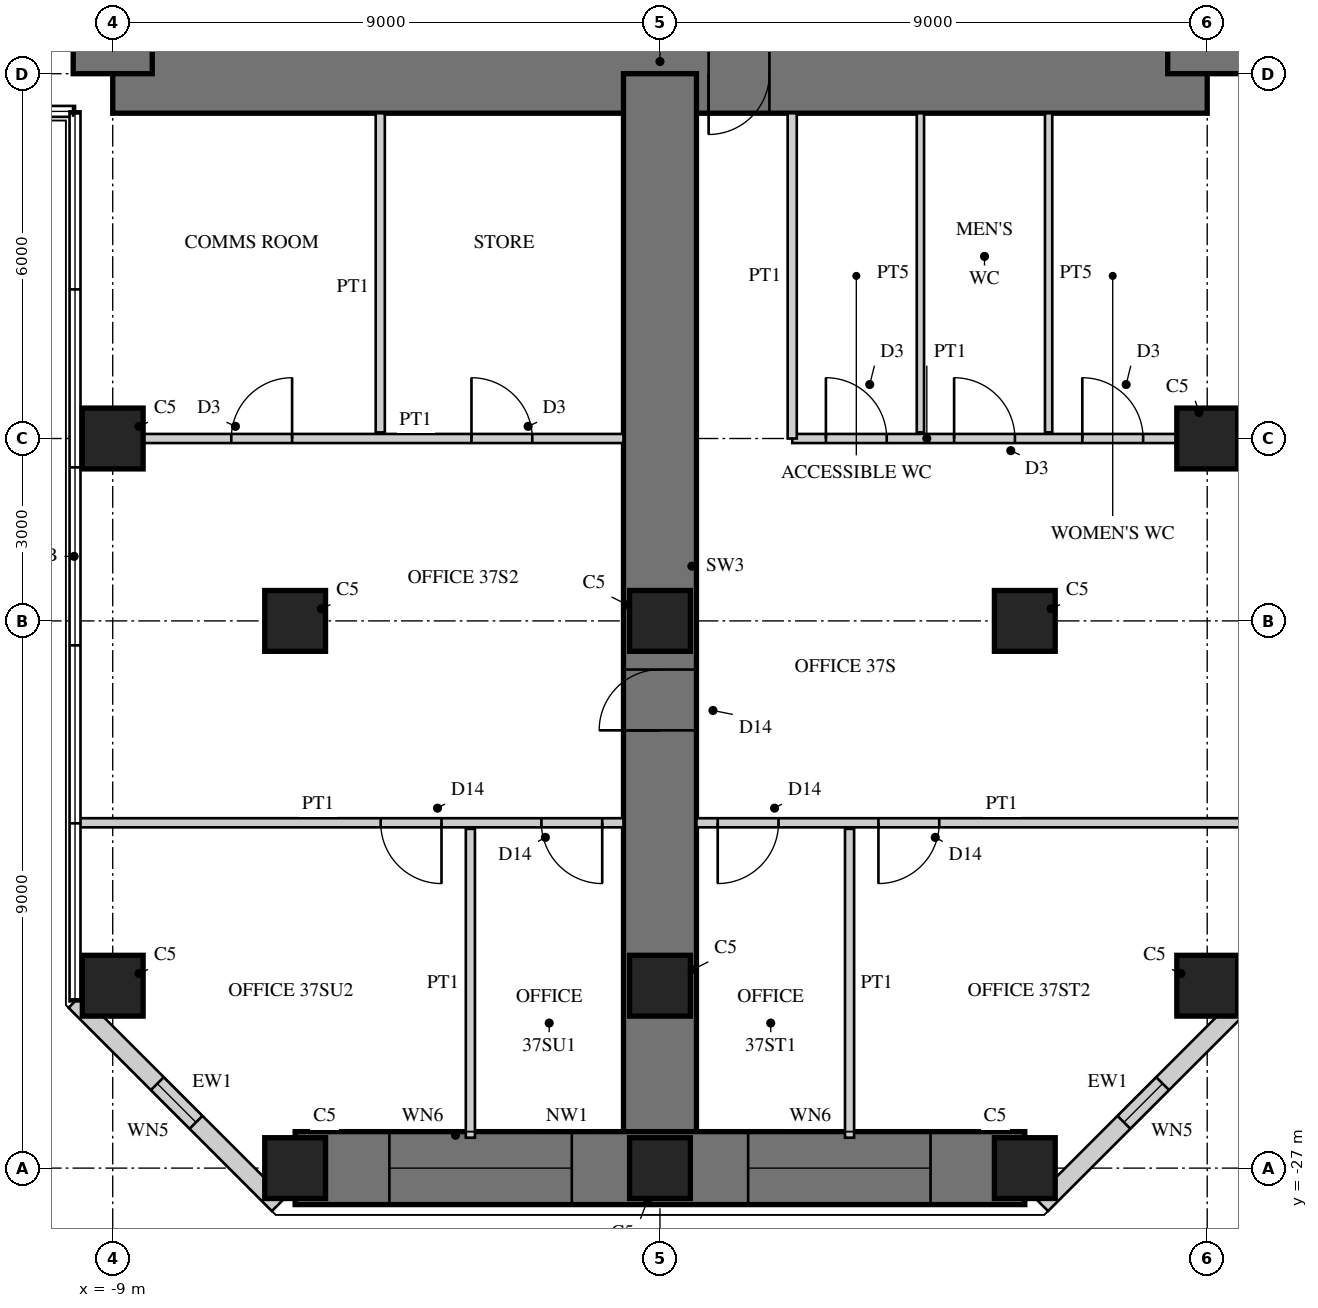
"""IFC4 building model, lengths in metres.
Left out: names, types, materials, properties, quantities, classifications, styles, units other than length and angle.
Written with IfcOpenShell. Run it as: python <this file> out.ifc"""

import sys

from ifc_helpers import new_model, si_unit, direction, frame, frame_2d, origin, origin_2d, place, context, subcontext, project, spatial, rectangle, hollow_rectangle, extrude, element, fill, save


model = new_model("IFC4")
c1 = context("Model", 3, precision=1e-05, world=origin(), true_north=direction((0.0, 1.0)))
c2 = subcontext(c1, "Body", "Model", "MODEL_VIEW")
j1 = project(units=[si_unit("LENGTHUNIT", "METRE"), si_unit("PLANEANGLEUNIT", "RADIAN")], contexts=[c1])
p1 = place(None, origin())
s1 = spatial("IfcSite", under=j1, at=p1, CompositionType="ELEMENT")
p2 = place(p1, origin())
s2 = spatial("IfcBuilding", under=s1, at=p2, CompositionType="ELEMENT")
p3 = place(p2, frame((0.0, 0.0, 152.5)))
s3 = spatial("IfcBuildingStorey", under=s2, at=p3, CompositionType="ELEMENT", Elevation=152.5)
p4 = place(p3, frame((-9.0, -9.0, 0.0), z_axis=(0.0, 0.0, 1.0), x_axis=(1.0, 0.0, 0.0)))
e1 = element("IfcWall", 1, at=p4, inside=s3, PredefinedType="SHEAR", context=c2, shape_type="SweptSolid", body=[
    extrude(rectangle(XDim=18.0, YDim=1.3, at=frame_2d((9.0, 0.0))), origin(), (0.0, 0.0, 1.0), 4.0),
])
p5 = place(p4, frame((9.8, 0.0, 0.0)))
e2 = element("IfcOpeningElement", 2, at=p5, cuts=e1, PredefinedType="OPENING", context=c2, shape_type="SweptSolid", body=[
    extrude(rectangle(XDim=1.0, YDim=2.4, at=frame_2d((0.5, 1.2))), frame((0.0, 0.66, 0.0), z_axis=(0.0, -1.0, 0.0), x_axis=(1.0, 0.0, 0.0)), (0.0, 0.0, 1.0), 1.32),
])
p6 = place(p3, frame((9.0, -9.0, 0.0), z_axis=(0.0, 0.0, 1.0), x_axis=(0.0, 1.0, 0.0)))
e3 = element("IfcWall", 3, at=p6, inside=s3, PredefinedType="SHEAR", context=c2, shape_type="SweptSolid", body=[
    extrude(rectangle(XDim=18.0, YDim=1.3, at=frame_2d((9.0, 0.0))), origin(), (0.0, 0.0, 1.0), 4.0),
])
p7 = place(p6, frame((9.8, 0.0, 0.0)))
e4 = element("IfcOpeningElement", 4, at=p7, cuts=e3, PredefinedType="OPENING", context=c2, shape_type="SweptSolid", body=[
    extrude(rectangle(XDim=1.0, YDim=2.4, at=frame_2d((0.5, 1.2))), frame((0.0, 0.66, 0.0), z_axis=(0.0, -1.0, 0.0), x_axis=(1.0, 0.0, 0.0)), (0.0, 0.0, 1.0), 1.32),
])
p8 = place(p3, frame((-9.0, 9.0, 0.0), z_axis=(0.0, 0.0, 1.0), x_axis=(0.0, -1.0, 0.0)))
e5 = element("IfcWall", 5, at=p8, inside=s3, PredefinedType="SHEAR", context=c2, shape_type="SweptSolid", body=[
    extrude(rectangle(XDim=18.0, YDim=1.3, at=frame_2d((9.0, 0.0))), origin(), (0.0, 0.0, 1.0), 4.0),
])
p9 = place(p8, frame((9.8, 0.0, 0.0)))
e6 = element("IfcOpeningElement", 6, at=p9, cuts=e5, PredefinedType="OPENING", context=c2, shape_type="SweptSolid", body=[
    extrude(rectangle(XDim=1.0, YDim=2.4, at=frame_2d((0.5, 1.2))), frame((0.0, 0.66, 0.0), z_axis=(0.0, -1.0, 0.0), x_axis=(1.0, 0.0, 0.0)), (0.0, 0.0, 1.0), 1.32),
])
p10 = place(p3, frame((0.0, -9.0, 0.0), z_axis=(0.0, 0.0, 1.0), x_axis=(0.0, -1.0, 0.0)))
e7 = element("IfcWall", 7, at=p10, inside=s3, PredefinedType="SHEAR", context=c2, shape_type="SweptSolid", body=[
    extrude(rectangle(XDim=18.0, YDim=1.2, at=frame_2d((9.0, 0.0))), origin(), (0.0, 0.0, 1.0), 4.0),
])
p11 = place(p10, frame((9.8, 0.0, 0.0)))
e8 = element("IfcOpeningElement", 8, at=p11, cuts=e7, PredefinedType="OPENING", context=c2, shape_type="SweptSolid", body=[
    extrude(rectangle(XDim=1.0, YDim=2.2, at=frame_2d((0.5, 1.1))), frame((0.0, 0.61, 0.0), z_axis=(0.0, -1.0, 0.0), x_axis=(1.0, 0.0, 0.0)), (0.0, 0.0, 1.0), 1.22),
])
p12 = place(p3, frame((-6.0, -27.0, 0.0), z_axis=(0.0, 0.0, 1.0), x_axis=(1.0, 0.0, 0.0)))
e9 = element("IfcWall", 9, at=p12, inside=s3, PredefinedType="SHEAR", context=c2, shape_type="SweptSolid", body=[
    extrude(rectangle(XDim=12.0, YDim=1.2, at=frame_2d((6.0, 0.0))), origin(), (0.0, 0.0, 1.0), 4.0),
])
p13 = place(p12, frame((1.55, 0.0, 0.6)))
e10 = element("IfcOpeningElement", 10, at=p13, cuts=e9, PredefinedType="OPENING", context=c2, shape_type="SweptSolid", body=[
    extrude(rectangle(XDim=3.0, YDim=2.4, at=frame_2d((1.5, 1.2))), frame((0.0, 0.61, 0.0), z_axis=(0.0, -1.0, 0.0), x_axis=(1.0, 0.0, 0.0)), (0.0, 0.0, 1.0), 1.22),
])
p14 = place(p12, frame((7.45, 0.0, 0.6)))
e11 = element("IfcOpeningElement", 11, at=p14, cuts=e9, PredefinedType="OPENING", context=c2, shape_type="SweptSolid", body=[
    extrude(rectangle(XDim=3.0, YDim=2.4, at=frame_2d((1.5, 1.2))), frame((0.0, 0.61, 0.0), z_axis=(0.0, -1.0, 0.0), x_axis=(1.0, 0.0, 0.0)), (0.0, 0.0, 1.0), 1.22),
])
for number, where, z_axis, x_axis in (
    (12, (-9.0, -15.0, 0.0), (0.0, 0.0, 1.0), (1.0, 0.0, 0.0)),
    (13, (-9.0, -24.0, 0.0), (0.0, 0.0, 1.0), (1.0, 0.0, 0.0)),
    (14, (9.0, -15.0, 0.0), (0.0, 0.0, 1.0), (1.0, 0.0, 0.0)),
    (15, (9.0, -24.0, 0.0), (0.0, 0.0, 1.0), (1.0, 0.0, 0.0)),
    (16, (-6.0, -27.0, 0.0), (0.0, 0.0, 1.0), (1.0, 0.0, 0.0)),
    (17, (0.0, -27.0, 0.0), (0.0, 0.0, 1.0), (1.0, 0.0, 0.0)),
    (18, (6.0, -27.0, 0.0), (0.0, 0.0, 1.0), (1.0, 0.0, 0.0)),
    (19, (-6.0, -18.0, 0.0), (0.0, 0.0, 1.0), (1.0, 0.0, 0.0)),
    (20, (0.0, -18.0, 0.0), (0.0, 0.0, 1.0), (1.0, 0.0, 0.0)),
    (21, (6.0, -18.0, 0.0), (0.0, 0.0, 1.0), (1.0, 0.0, 0.0)),
    (22, (0.0, -24.0, 0.0), (0.0, 0.0, 1.0), (1.0, 0.0, 0.0)),
):
    element("IfcColumn", number, at=place(p3, frame(where, z_axis=z_axis, x_axis=x_axis)), inside=s3, PredefinedType="COLUMN", context=c2, shape_type="SweptSolid", body=[
        extrude(rectangle(XDim=1.0, YDim=1.0, at=origin_2d()), origin(), (0.0, 0.0, 1.0), 4.0),
    ])
p15 = place(p3, frame((-9.62, -24.257, 0.0), z_axis=(0.0, 0.0, 1.0), x_axis=(0.707106781187, -0.707106781187, 0.0)))
e23 = element("IfcWall", 23, at=p15, inside=s3, PredefinedType="SOLIDWALL", context=c2, shape_type="SweptSolid", body=[
    extrude(rectangle(XDim=4.728, YDim=0.3, at=frame_2d((2.364, 0.0))), origin(), (0.0, 0.0, 1.0), 3.8),
])
p16 = place(p15, frame((1.914, 0.0, 0.3)))
e24 = element("IfcOpeningElement", 24, at=p16, cuts=e23, PredefinedType="OPENING", context=c2, shape_type="SweptSolid", body=[
    extrude(rectangle(XDim=0.9, YDim=2.4, at=frame_2d((0.45, 1.2))), frame((0.0, 0.16, 0.0), z_axis=(0.0, -1.0, 0.0), x_axis=(1.0, 0.0, 0.0)), (0.0, 0.0, 1.0), 0.32),
])
p17 = place(p3, frame((6.277, -27.6, 0.0), z_axis=(0.0, 0.0, 1.0), x_axis=(0.707106781187, 0.707106781187, 0.0)))
e25 = element("IfcWall", 25, at=p17, inside=s3, PredefinedType="SOLIDWALL", context=c2, shape_type="SweptSolid", body=[
    extrude(rectangle(XDim=4.728, YDim=0.3, at=frame_2d((2.364, 0.0))), origin(), (0.0, 0.0, 1.0), 3.8),
])
p18 = place(p17, frame((1.914, 0.0, 0.3)))
e26 = element("IfcOpeningElement", 26, at=p18, cuts=e25, PredefinedType="OPENING", context=c2, shape_type="SweptSolid", body=[
    extrude(rectangle(XDim=0.9, YDim=2.4, at=frame_2d((0.45, 1.2))), frame((0.0, 0.16, 0.0), z_axis=(0.0, -1.0, 0.0), x_axis=(1.0, 0.0, 0.0)), (0.0, 0.0, 1.0), 0.32),
])
p19 = place(p3, frame((2.175, -15.0, 0.0), z_axis=(0.0, 0.0, 1.0), x_axis=(1.0, 0.0, 0.0)))
e27 = element("IfcWall", 27, at=p19, inside=s3, PredefinedType="PARTITIONING", context=c2, shape_type="SweptSolid", body=[
    extrude(rectangle(XDim=6.325, YDim=0.15, at=frame_2d((3.163, 0.0))), origin(), (0.0, 0.0, 1.0), 3.0),
])
p20 = place(p19, frame((0.554, 0.0, 0.0)))
e28 = element("IfcOpeningElement", 28, at=p20, cuts=e27, PredefinedType="OPENING", context=c2, shape_type="SweptSolid", body=[
    extrude(rectangle(XDim=1.0, YDim=2.1, at=frame_2d((0.5, 1.05))), frame((0.0, 0.085, 0.0), z_axis=(0.0, -1.0, 0.0), x_axis=(1.0, 0.0, 0.0)), (0.0, 0.0, 1.0), 0.17),
])
p21 = place(p19, frame((2.663, 0.0, 0.0)))
e29 = element("IfcOpeningElement", 29, at=p21, cuts=e27, PredefinedType="OPENING", context=c2, shape_type="SweptSolid", body=[
    extrude(rectangle(XDim=1.0, YDim=2.1, at=frame_2d((0.5, 1.05))), frame((0.0, 0.085, 0.0), z_axis=(0.0, -1.0, 0.0), x_axis=(1.0, 0.0, 0.0)), (0.0, 0.0, 1.0), 0.17),
])
p22 = place(p19, frame((4.771, 0.0, 0.0)))
e30 = element("IfcOpeningElement", 30, at=p22, cuts=e27, PredefinedType="OPENING", context=c2, shape_type="SweptSolid", body=[
    extrude(rectangle(XDim=1.0, YDim=2.1, at=frame_2d((0.5, 1.05))), frame((0.0, 0.085, 0.0), z_axis=(0.0, -1.0, 0.0), x_axis=(1.0, 0.0, 0.0)), (0.0, 0.0, 1.0), 0.17),
])
p23 = place(p3, frame((2.175, -9.65, 0.0), z_axis=(0.0, 0.0, 1.0), x_axis=(0.0, -1.0, 0.0)))
e31 = element("IfcWall", 31, at=p23, inside=s3, PredefinedType="PARTITIONING", context=c2, shape_type="SweptSolid", body=[
    extrude(rectangle(XDim=5.35, YDim=0.15, at=frame_2d((2.675, 0.0))), origin(), (0.0, 0.0, 1.0), 3.8),
])
for number, where, z_axis, x_axis in (
    (32, (4.283, -9.65, 0.0), (0.0, 0.0, 1.0), (0.0, -1.0, 0.0)),
    (33, (6.392, -9.65, 0.0), (0.0, 0.0, 1.0), (0.0, -1.0, 0.0)),
):
    element("IfcWall", number, at=place(p3, frame(where, z_axis=z_axis, x_axis=x_axis)), inside=s3, PredefinedType="PLUMBINGWALL", context=c2, shape_type="SweptSolid", body=[
        extrude(rectangle(XDim=5.25, YDim=0.12, at=frame_2d((2.625, 0.0))), origin(), (0.0, 0.0, 1.0), 3.8),
    ])
p24 = place(p3, frame((-8.5, -15.0, 0.0), z_axis=(0.0, 0.0, 1.0), x_axis=(1.0, 0.0, 0.0)))
e34 = element("IfcWall", 34, at=p24, inside=s3, PredefinedType="PARTITIONING", context=c2, shape_type="SweptSolid", body=[
    extrude(rectangle(XDim=7.9, YDim=0.15, at=frame_2d((3.95, 0.0))), origin(), (0.0, 0.0, 1.0), 3.0),
])
p25 = place(p24, frame((1.45, 0.0, 0.0)))
e35 = element("IfcOpeningElement", 35, at=p25, cuts=e34, PredefinedType="OPENING", context=c2, shape_type="SweptSolid", body=[
    extrude(rectangle(XDim=1.0, YDim=2.1, at=frame_2d((0.5, 1.05))), frame((0.0, 0.085, 0.0), z_axis=(0.0, -1.0, 0.0), x_axis=(1.0, 0.0, 0.0)), (0.0, 0.0, 1.0), 0.17),
])
p26 = place(p24, frame((5.4, 0.0, 0.0)))
e36 = element("IfcOpeningElement", 36, at=p26, cuts=e34, PredefinedType="OPENING", context=c2, shape_type="SweptSolid", body=[
    extrude(rectangle(XDim=1.0, YDim=2.1, at=frame_2d((0.5, 1.05))), frame((0.0, 0.085, 0.0), z_axis=(0.0, -1.0, 0.0), x_axis=(1.0, 0.0, 0.0)), (0.0, 0.0, 1.0), 0.17),
])
p27 = place(p3, frame((-4.6, -9.65, 0.0), z_axis=(0.0, 0.0, 1.0), x_axis=(0.0, -1.0, 0.0)))
e37 = element("IfcWall", 37, at=p27, inside=s3, PredefinedType="PARTITIONING", context=c2, shape_type="SweptSolid", body=[
    extrude(rectangle(XDim=5.25, YDim=0.15, at=frame_2d((2.625, 0.0))), origin(), (0.0, 0.0, 1.0), 3.8),
])
p28 = place(p3, frame((3.118, -21.42, 0.0), z_axis=(0.0, 0.0, 1.0), x_axis=(0.0, -1.0, 0.0)))
e38 = element("IfcWall", 38, at=p28, inside=s3, PredefinedType="PARTITIONING", context=c2, shape_type="SweptSolid", body=[
    extrude(rectangle(XDim=5.08, YDim=0.15, at=frame_2d((2.54, 0.0))), origin(), (0.0, 0.0, 1.0), 3.8),
])
p29 = place(p3, frame((0.6, -21.32, 0.0), z_axis=(0.0, 0.0, 1.0), x_axis=(1.0, 0.0, 0.0)))
e39 = element("IfcWall", 39, at=p29, inside=s3, PredefinedType="PARTITIONING", context=c2, shape_type="SweptSolid", body=[
    extrude(rectangle(XDim=8.98, YDim=0.15, at=frame_2d((4.49, 0.0))), origin(), (0.0, 0.0, 1.0), 3.8),
])
p30 = place(p29, frame((0.35, 0.0, 0.0)))
e40 = element("IfcOpeningElement", 40, at=p30, cuts=e39, PredefinedType="OPENING", context=c2, shape_type="SweptSolid", body=[
    extrude(rectangle(XDim=1.0, YDim=2.2, at=frame_2d((0.5, 1.1))), frame((0.0, 0.085, 0.0), z_axis=(0.0, -1.0, 0.0), x_axis=(1.0, 0.0, 0.0)), (0.0, 0.0, 1.0), 0.17),
])
p31 = place(p29, frame((2.993, 0.0, 0.0)))
e41 = element("IfcOpeningElement", 41, at=p31, cuts=e39, PredefinedType="OPENING", context=c2, shape_type="SweptSolid", body=[
    extrude(rectangle(XDim=1.0, YDim=2.2, at=frame_2d((0.5, 1.1))), frame((0.0, 0.085, 0.0), z_axis=(0.0, -1.0, 0.0), x_axis=(1.0, 0.0, 0.0)), (0.0, 0.0, 1.0), 0.17),
])
p32 = place(p3, frame((-3.118, -21.42, 0.0), z_axis=(0.0, 0.0, 1.0), x_axis=(0.0, -1.0, 0.0)))
e42 = element("IfcWall", 42, at=p32, inside=s3, PredefinedType="PARTITIONING", context=c2, shape_type="SweptSolid", body=[
    extrude(rectangle(XDim=5.08, YDim=0.15, at=frame_2d((2.54, 0.0))), origin(), (0.0, 0.0, 1.0), 3.8),
])
p33 = place(p3, frame((-9.58, -21.32, 0.0), z_axis=(0.0, 0.0, 1.0), x_axis=(1.0, 0.0, 0.0)))
e43 = element("IfcWall", 43, at=p33, inside=s3, PredefinedType="PARTITIONING", context=c2, shape_type="SweptSolid", body=[
    extrude(rectangle(XDim=8.98, YDim=0.15, at=frame_2d((4.49, 0.0))), origin(), (0.0, 0.0, 1.0), 3.8),
])
p34 = place(p33, frame((4.987, 0.0, 0.0)))
e44 = element("IfcOpeningElement", 44, at=p34, cuts=e43, PredefinedType="OPENING", context=c2, shape_type="SweptSolid", body=[
    extrude(rectangle(XDim=1.0, YDim=2.2, at=frame_2d((0.5, 1.1))), frame((0.0, 0.085, 0.0), z_axis=(0.0, -1.0, 0.0), x_axis=(1.0, 0.0, 0.0)), (0.0, 0.0, 1.0), 0.17),
])
p35 = place(p33, frame((7.63, 0.0, 0.0)))
e45 = element("IfcOpeningElement", 45, at=p35, cuts=e43, PredefinedType="OPENING", context=c2, shape_type="SweptSolid", body=[
    extrude(rectangle(XDim=1.0, YDim=2.2, at=frame_2d((0.5, 1.1))), frame((0.0, 0.085, 0.0), z_axis=(0.0, -1.0, 0.0), x_axis=(1.0, 0.0, 0.0)), (0.0, 0.0, 1.0), 0.17),
])
p36 = place(p16, origin())
e46 = element("IfcWindow", 46, at=p36, inside=s3, PartitioningType="SINGLE_PANEL", PredefinedType="WINDOW", context=c2, shape_type="SweptSolid", body=[
    extrude(hollow_rectangle(XDim=0.9, YDim=2.4, WallThickness=0.06, at=frame_2d((0.45, 1.2))), frame((0.0, 0.03, 0.0), z_axis=(0.0, -1.0, 0.0), x_axis=(1.0, 0.0, 0.0)), (0.0, 0.0, 1.0), 0.06),
    extrude(rectangle(XDim=0.779, YDim=2.279, at=frame_2d((0.45, 1.2))), frame((0.0, 0.03, 0.0), z_axis=(0.0, -1.0, 0.0), x_axis=(1.0, 0.0, 0.0)), (0.0, 0.0, 1.0), 0.06),
])
fill(e24, e46)
p37 = place(p13, origin())
e47 = element("IfcWindow", 47, at=p37, inside=s3, PartitioningType="SINGLE_PANEL", PredefinedType="WINDOW", context=c2, shape_type="SweptSolid", body=[
    extrude(hollow_rectangle(XDim=3.0, YDim=2.4, WallThickness=0.06, at=frame_2d((1.5, 1.2))), frame((0.0, 0.03, 0.0), z_axis=(0.0, -1.0, 0.0), x_axis=(1.0, 0.0, 0.0)), (0.0, 0.0, 1.0), 0.06),
    extrude(rectangle(XDim=2.879, YDim=2.279, at=frame_2d((1.5, 1.2))), frame((0.0, 0.03, 0.0), z_axis=(0.0, -1.0, 0.0), x_axis=(1.0, 0.0, 0.0)), (0.0, 0.0, 1.0), 0.06),
])
fill(e10, e47)
p38 = place(p14, origin())
e48 = element("IfcWindow", 48, at=p38, inside=s3, PartitioningType="SINGLE_PANEL", PredefinedType="WINDOW", context=c2, shape_type="SweptSolid", body=[
    extrude(hollow_rectangle(XDim=3.0, YDim=2.4, WallThickness=0.06, at=frame_2d((1.5, 1.2))), frame((0.0, 0.03, 0.0), z_axis=(0.0, -1.0, 0.0), x_axis=(1.0, 0.0, 0.0)), (0.0, 0.0, 1.0), 0.06),
    extrude(rectangle(XDim=2.879, YDim=2.279, at=frame_2d((1.5, 1.2))), frame((0.0, 0.03, 0.0), z_axis=(0.0, -1.0, 0.0), x_axis=(1.0, 0.0, 0.0)), (0.0, 0.0, 1.0), 0.06),
])
fill(e11, e48)
p39 = place(p18, origin())
e49 = element("IfcWindow", 49, at=p39, inside=s3, PartitioningType="SINGLE_PANEL", PredefinedType="WINDOW", context=c2, shape_type="SweptSolid", body=[
    extrude(hollow_rectangle(XDim=0.9, YDim=2.4, WallThickness=0.06, at=frame_2d((0.45, 1.2))), frame((0.0, 0.03, 0.0), z_axis=(0.0, -1.0, 0.0), x_axis=(1.0, 0.0, 0.0)), (0.0, 0.0, 1.0), 0.06),
    extrude(rectangle(XDim=0.779, YDim=2.279, at=frame_2d((0.45, 1.2))), frame((0.0, 0.03, 0.0), z_axis=(0.0, -1.0, 0.0), x_axis=(1.0, 0.0, 0.0)), (0.0, 0.0, 1.0), 0.06),
])
fill(e26, e49)
p40 = place(p20, origin())
e50 = element("IfcDoor", 50, at=p40, inside=s3, OperationType="SINGLE_SWING_LEFT", PredefinedType="DOOR", context=c2, shape_type="SweptSolid", body=[
    extrude(rectangle(XDim=1.0, YDim=2.1, at=frame_2d((0.5, 1.05))), frame((0.0, 0.025, 0.0), z_axis=(0.0, -1.0, 0.0), x_axis=(1.0, 0.0, 0.0)), (0.0, 0.0, 1.0), 0.05),
])
fill(e28, e50)
p41 = place(p21, origin())
e51 = element("IfcDoor", 51, at=p41, inside=s3, OperationType="SINGLE_SWING_LEFT", PredefinedType="DOOR", context=c2, shape_type="SweptSolid", body=[
    extrude(rectangle(XDim=1.0, YDim=2.1, at=frame_2d((0.5, 1.05))), frame((0.0, 0.025, 0.0), z_axis=(0.0, -1.0, 0.0), x_axis=(1.0, 0.0, 0.0)), (0.0, 0.0, 1.0), 0.05),
])
fill(e29, e51)
p42 = place(p22, origin())
e52 = element("IfcDoor", 52, at=p42, inside=s3, OperationType="SINGLE_SWING_LEFT", PredefinedType="DOOR", context=c2, shape_type="SweptSolid", body=[
    extrude(rectangle(XDim=1.0, YDim=2.1, at=frame_2d((0.5, 1.05))), frame((0.0, 0.025, 0.0), z_axis=(0.0, -1.0, 0.0), x_axis=(1.0, 0.0, 0.0)), (0.0, 0.0, 1.0), 0.05),
])
fill(e30, e52)
p43 = place(p25, origin())
e53 = element("IfcDoor", 53, at=p43, inside=s3, OperationType="SINGLE_SWING_RIGHT", PredefinedType="DOOR", context=c2, shape_type="SweptSolid", body=[
    extrude(rectangle(XDim=1.0, YDim=2.1, at=frame_2d((0.5, 1.05))), frame((0.0, 0.025, 0.0), z_axis=(0.0, -1.0, 0.0), x_axis=(1.0, 0.0, 0.0)), (0.0, 0.0, 1.0), 0.05),
])
fill(e35, e53)
p44 = place(p26, origin())
e54 = element("IfcDoor", 54, at=p44, inside=s3, OperationType="SINGLE_SWING_LEFT", PredefinedType="DOOR", context=c2, shape_type="SweptSolid", body=[
    extrude(rectangle(XDim=1.0, YDim=2.1, at=frame_2d((0.5, 1.05))), frame((0.0, 0.025, 0.0), z_axis=(0.0, -1.0, 0.0), x_axis=(1.0, 0.0, 0.0)), (0.0, 0.0, 1.0), 0.05),
])
fill(e36, e54)
p45 = place(p30, frame((1.0, 0.0, 0.0), z_axis=(0.0, 0.0, 1.0), x_axis=(-1.0, 0.0, 0.0)))
e55 = element("IfcDoor", 55, at=p45, inside=s3, OperationType="SINGLE_SWING_RIGHT", PredefinedType="DOOR", context=c2, shape_type="SweptSolid", body=[
    extrude(rectangle(XDim=1.0, YDim=2.2, at=frame_2d((0.5, 1.1))), frame((0.0, 0.025, 0.0), z_axis=(0.0, -1.0, 0.0), x_axis=(1.0, 0.0, 0.0)), (0.0, 0.0, 1.0), 0.05),
])
fill(e40, e55)
p46 = place(p31, frame((1.0, 0.0, 0.0), z_axis=(0.0, 0.0, 1.0), x_axis=(-1.0, 0.0, 0.0)))
e56 = element("IfcDoor", 56, at=p46, inside=s3, OperationType="SINGLE_SWING_RIGHT", PredefinedType="DOOR", context=c2, shape_type="SweptSolid", body=[
    extrude(rectangle(XDim=1.0, YDim=2.2, at=frame_2d((0.5, 1.1))), frame((0.0, 0.025, 0.0), z_axis=(0.0, -1.0, 0.0), x_axis=(1.0, 0.0, 0.0)), (0.0, 0.0, 1.0), 0.05),
])
fill(e41, e56)
p47 = place(p34, frame((1.0, 0.0, 0.0), z_axis=(0.0, 0.0, 1.0), x_axis=(-1.0, 0.0, 0.0)))
e57 = element("IfcDoor", 57, at=p47, inside=s3, OperationType="SINGLE_SWING_LEFT", PredefinedType="DOOR", context=c2, shape_type="SweptSolid", body=[
    extrude(rectangle(XDim=1.0, YDim=2.2, at=frame_2d((0.5, 1.1))), frame((0.0, 0.025, 0.0), z_axis=(0.0, -1.0, 0.0), x_axis=(1.0, 0.0, 0.0)), (0.0, 0.0, 1.0), 0.05),
])
fill(e44, e57)
p48 = place(p35, frame((1.0, 0.0, 0.0), z_axis=(0.0, 0.0, 1.0), x_axis=(-1.0, 0.0, 0.0)))
e58 = element("IfcDoor", 58, at=p48, inside=s3, OperationType="SINGLE_SWING_LEFT", PredefinedType="DOOR", context=c2, shape_type="SweptSolid", body=[
    extrude(rectangle(XDim=1.0, YDim=2.2, at=frame_2d((0.5, 1.1))), frame((0.0, 0.025, 0.0), z_axis=(0.0, -1.0, 0.0), x_axis=(1.0, 0.0, 0.0)), (0.0, 0.0, 1.0), 0.05),
])
fill(e45, e58)
p49 = place(p11, frame((1.0, 0.0, 0.0), z_axis=(0.0, 0.0, 1.0), x_axis=(-1.0, 0.0, 0.0)))
e59 = element("IfcDoor", 59, at=p49, inside=s3, OperationType="SINGLE_SWING_LEFT", PredefinedType="DOOR", context=c2, shape_type="SweptSolid", body=[
    extrude(rectangle(XDim=1.0, YDim=2.2, at=frame_2d((0.5, 1.1))), frame((0.0, 0.025, 0.0), z_axis=(0.0, -1.0, 0.0), x_axis=(1.0, 0.0, 0.0)), (0.0, 0.0, 1.0), 0.05),
])
fill(e8, e59)
p50 = place(p5, frame((1.0, 0.0, 0.0), z_axis=(0.0, 0.0, 1.0), x_axis=(-1.0, 0.0, 0.0)))
e60 = element("IfcDoor", 60, at=p50, inside=s3, OperationType="SINGLE_SWING_RIGHT", PredefinedType="DOOR", context=c2, shape_type="SweptSolid", body=[
    extrude(rectangle(XDim=1.0, YDim=2.4, at=frame_2d((0.5, 1.2))), frame((0.0, -0.005, 0.0), z_axis=(0.0, -1.0, 0.0), x_axis=(1.0, 0.0, 0.0)), (0.0, 0.0, 1.0), 0.05),
])
fill(e2, e60)
save(model, sys.argv[1])
